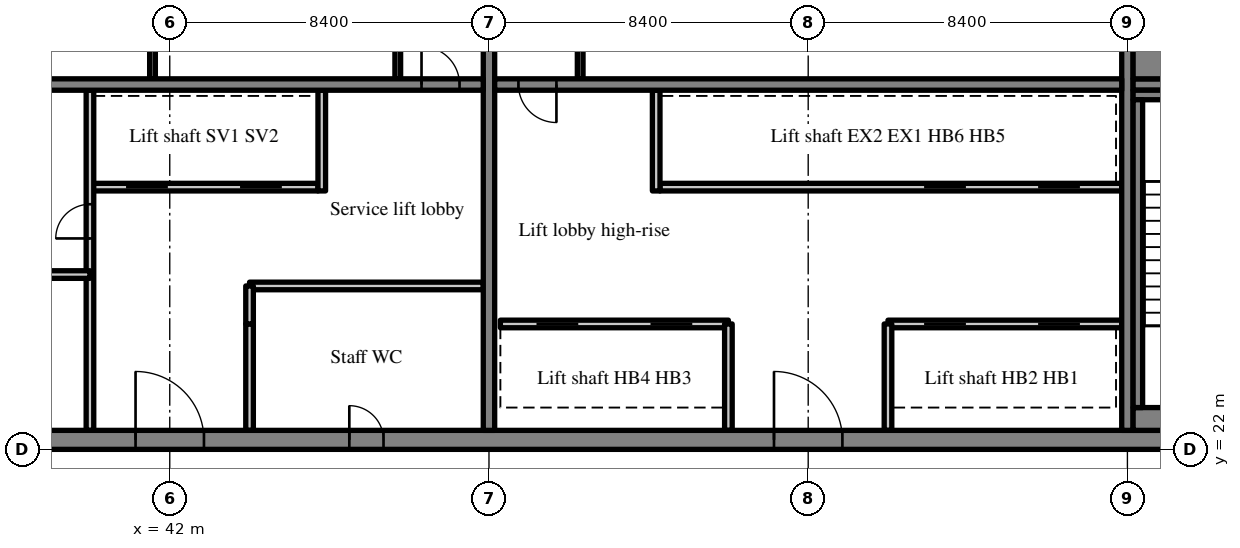
"""IFC4 building model, lengths in metres.
Left out: names, types, materials, properties, quantities, classifications, styles, units other than length and angle.
Written with IfcOpenShell. Run it as: python <this file> out.ifc"""

import sys

from ifc_helpers import new_model, si_unit, direction, frame, frame_2d, origin, place, context, subcontext, project, spatial, rectangle, extrude, source, transform, mapped, element, fill, save


model = new_model("IFC4")
c1 = context("Model", 3, precision=1e-05, world=origin(), true_north=direction((0.0, 1.0)))
c2 = subcontext(c1, "Body", "Model", "MODEL_VIEW")
j1 = project(units=[si_unit("LENGTHUNIT", "METRE"), si_unit("PLANEANGLEUNIT", "RADIAN")], contexts=[c1])
p1 = place(None, origin())
s1 = spatial("IfcSite", under=j1, at=p1, CompositionType="ELEMENT")
p2 = place(p1, origin())
s2 = spatial("IfcBuilding", under=s1, at=p2, CompositionType="ELEMENT")
p3 = place(p2, frame((0.0, 0.0, 305.7)))
s3 = spatial("IfcBuildingStorey", under=s2, at=p3, CompositionType="ELEMENT", Elevation=305.7)
m1 = source(origin(), c2, "Body", "SweptSolid", [
    extrude(rectangle(XDim=50.4, YDim=0.5, at=frame_2d((25.2, 0.0))), origin(), (0.0, 0.0, 1.0), 3.72),
])
p4 = place(p3, frame((25.2, 22.25, 0.0), z_axis=(0.0, 0.0, 1.0), x_axis=(1.0, 0.0, 0.0)))
e1 = element("IfcWall", 1, at=p4, inside=s3, PredefinedType="SHEAR", context=c2, shape_type="MappedRepresentation", body=[
    mapped(m1, transform((0.0, 0.0, 0.0), scale=1.0)),
])
m2 = source(origin(), c2, "Body", "SweptSolid", [
    extrude(rectangle(XDim=1.8, YDim=2.1, at=frame_2d((0.9, 1.05))), frame((0.0, 0.26, 0.0), z_axis=(0.0, -1.0, 0.0), x_axis=(1.0, 0.0, 0.0)), (0.0, 0.0, 1.0), 0.52),
])
p5 = place(p4, frame((15.9, 0.0, 0.0)))
e2 = element("IfcOpeningElement", 2, at=p5, cuts=e1, PredefinedType="OPENING", context=c2, shape_type="MappedRepresentation", body=[
    mapped(m2, transform((0.0, 0.0, 0.0), scale=1.0)),
])
m3 = source(origin(), c2, "Body", "SweptSolid", [
    extrude(rectangle(XDim=0.9, YDim=2.1, at=frame_2d((0.45, 1.05))), frame((0.0, 0.26, 0.0), z_axis=(0.0, -1.0, 0.0), x_axis=(1.0, 0.0, 0.0)), (0.0, 0.0, 1.0), 0.52),
])
p6 = place(p4, frame((11.175, 0.0, 0.0)))
e3 = element("IfcOpeningElement", 3, at=p6, cuts=e1, PredefinedType="OPENING", context=c2, shape_type="MappedRepresentation", body=[
    mapped(m3, transform((0.0, 0.0, 0.0), scale=1.0)),
])
p7 = place(p4, frame((21.525, 0.0, 0.0)))
e4 = element("IfcOpeningElement", 4, at=p7, cuts=e1, PredefinedType="OPENING", context=c2, shape_type="MappedRepresentation", body=[
    mapped(m3, transform((0.0, 0.0, 0.0), scale=1.0)),
])
p8 = place(p4, frame((32.7, 0.0, 0.0)))
e5 = element("IfcOpeningElement", 5, at=p8, cuts=e1, PredefinedType="OPENING", context=c2, shape_type="MappedRepresentation", body=[
    mapped(m2, transform((0.0, 0.0, 0.0), scale=1.0)),
])
m4 = source(origin(), c2, "Body", "SweptSolid", [
    extrude(rectangle(XDim=1.2, YDim=2.1, at=frame_2d((0.6, 1.05))), frame((0.0, 0.26, 0.0), z_axis=(0.0, -1.0, 0.0), x_axis=(1.0, 0.0, 0.0)), (0.0, 0.0, 1.0), 0.52),
])
p9 = place(p4, frame((6.5, 0.0, 0.0)))
e6 = element("IfcOpeningElement", 6, at=p9, cuts=e1, PredefinedType="OPENING", context=c2, shape_type="MappedRepresentation", body=[
    mapped(m4, transform((0.0, 0.0, 0.0), scale=1.0)),
])
p10 = place(p4, frame((47.975, 0.0, 0.0)))
e7 = element("IfcOpeningElement", 7, at=p10, cuts=e1, PredefinedType="OPENING", context=c2, shape_type="MappedRepresentation", body=[
    mapped(m4, transform((0.0, 0.0, 0.0), scale=1.0)),
])
m5 = source(origin(), c2, "Body", "SweptSolid", [
    extrude(rectangle(XDim=19.0, YDim=0.3, at=frame_2d((9.5, 0.0))), origin(), (0.0, 0.0, 1.0), 3.72),
])
p11 = place(p3, frame((50.4, 22.5, 0.0), z_axis=(0.0, 0.0, 1.0), x_axis=(0.0, 1.0, 0.0)))
e8 = element("IfcWall", 8, at=p11, inside=s3, PredefinedType="SHEAR", context=c2, shape_type="MappedRepresentation", body=[
    mapped(m5, transform((0.0, 0.0, 0.0), scale=1.0)),
])
m6 = source(origin(), c2, "Body", "SweptSolid", [
    extrude(rectangle(XDim=1.1, YDim=2.1, at=frame_2d((0.55, 1.05))), frame((0.0, 0.16, 0.0), z_axis=(0.0, -1.0, 0.0), x_axis=(1.0, 0.0, 0.0)), (0.0, 0.0, 1.0), 0.32),
])
p12 = place(p11, frame((12.95, 0.0, 0.0)))
e9 = element("IfcOpeningElement", 9, at=p12, cuts=e8, PredefinedType="OPENING", context=c2, shape_type="MappedRepresentation", body=[
    mapped(m6, transform((0.0, 0.0, 0.0), scale=1.0)),
])
p13 = place(p3, frame((67.2, 22.5, 0.0), z_axis=(0.0, 0.0, 1.0), x_axis=(0.0, 1.0, 0.0)))
e10 = element("IfcWall", 10, at=p13, inside=s3, PredefinedType="SHEAR", context=c2, shape_type="MappedRepresentation", body=[
    mapped(m5, transform((0.0, 0.0, 0.0), scale=1.0)),
])
m7 = source(origin(), c2, "Body", "SweptSolid", [
    extrude(rectangle(XDim=16.5, YDim=0.3, at=frame_2d((8.25, 0.0))), origin(), (0.0, 0.0, 1.0), 3.72),
])
p14 = place(p3, frame((33.75, 31.6, 0.0), z_axis=(0.0, 0.0, 1.0), x_axis=(1.0, 0.0, 0.0)))
e11 = element("IfcWall", 11, at=p14, inside=s3, PredefinedType="SHEAR", context=c2, shape_type="MappedRepresentation", body=[
    mapped(m7, transform((0.0, 0.0, 0.0), scale=1.0)),
])
m8 = source(origin(), c2, "Body", "SweptSolid", [
    extrude(rectangle(XDim=1.0, YDim=2.1, at=frame_2d((0.5, 1.05))), frame((0.0, 0.16, 0.0), z_axis=(0.0, -1.0, 0.0), x_axis=(1.0, 0.0, 0.0)), (0.0, 0.0, 1.0), 0.32),
])
p15 = place(p14, frame((14.875, 0.0, 0.0)))
e12 = element("IfcOpeningElement", 12, at=p15, cuts=e11, PredefinedType="OPENING", context=c2, shape_type="MappedRepresentation", body=[
    mapped(m8, transform((0.0, 0.0, 0.0), scale=1.0)),
])
p16 = place(p3, frame((50.55, 31.6, 0.0), z_axis=(0.0, 0.0, 1.0), x_axis=(1.0, 0.0, 0.0)))
e13 = element("IfcWall", 13, at=p16, inside=s3, PredefinedType="SHEAR", context=c2, shape_type="MappedRepresentation", body=[
    mapped(m7, transform((0.0, 0.0, 0.0), scale=1.0)),
])
p17 = place(p16, frame((0.625, 0.0, 0.0)))
e14 = element("IfcOpeningElement", 14, at=p17, cuts=e13, PredefinedType="OPENING", context=c2, shape_type="MappedRepresentation", body=[
    mapped(m8, transform((0.0, 0.0, 0.0), scale=1.0)),
])
m9 = source(origin(), c2, "Body", "SweptSolid", [
    extrude(rectangle(XDim=7.75, YDim=0.3, at=frame_2d((3.875, 0.0))), origin(), (0.0, 0.0, 1.0), 3.72),
])
p18 = place(p3, frame((67.35, 31.6, 0.0), z_axis=(0.0, 0.0, 1.0), x_axis=(1.0, 0.0, 0.0)))
e15 = element("IfcWall", 15, at=p18, inside=s3, PredefinedType="SHEAR", context=c2, shape_type="MappedRepresentation", body=[
    mapped(m9, transform((0.0, 0.0, 0.0), scale=1.0)),
])
p19 = place(p18, frame((5.875, 0.0, 0.0)))
e16 = element("IfcOpeningElement", 16, at=p19, cuts=e15, PredefinedType="OPENING", context=c2, shape_type="MappedRepresentation", body=[
    mapped(m6, transform((0.0, 0.0, 0.0), scale=1.0)),
])
m10 = source(origin(), c2, "Body", "SweptSolid", [
    extrude(rectangle(XDim=6.0, YDim=0.2, at=frame_2d((3.0, 0.0))), origin(), (0.0, 0.0, 1.0), 3.72),
])
p20 = place(p3, frame((39.9, 28.9, 0.0), z_axis=(0.0, 0.0, 1.0), x_axis=(1.0, 0.0, 0.0)))
e17 = element("IfcWall", 17, at=p20, inside=s3, PredefinedType="SOLIDWALL", context=c2, shape_type="MappedRepresentation", body=[
    mapped(m10, transform((0.0, 0.0, 0.0), scale=1.0)),
])
m11 = source(origin(), c2, "Body", "SweptSolid", [
    extrude(rectangle(XDim=1.1, YDim=2.1, at=frame_2d((0.55, 1.05))), frame((0.0, 0.11, 0.0), z_axis=(0.0, -1.0, 0.0), x_axis=(1.0, 0.0, 0.0)), (0.0, 0.0, 1.0), 0.22),
])
p21 = place(p20, frame((0.95, 0.0, 0.0)))
e18 = element("IfcOpeningElement", 18, at=p21, cuts=e17, PredefinedType="OPENING", context=c2, shape_type="MappedRepresentation", body=[
    mapped(m11, transform((0.0, 0.0, 0.0), scale=1.0)),
])
p22 = place(p20, frame((3.95, 0.0, 0.0)))
e19 = element("IfcOpeningElement", 19, at=p22, cuts=e17, PredefinedType="OPENING", context=c2, shape_type="MappedRepresentation", body=[
    mapped(m11, transform((0.0, 0.0, 0.0), scale=1.0)),
])
m12 = source(origin(), c2, "Body", "SweptSolid", [
    extrude(rectangle(XDim=8.95, YDim=0.2, at=frame_2d((4.475, 0.0))), origin(), (0.0, 0.0, 1.0), 3.72),
])
p23 = place(p3, frame((39.9, 22.5, 0.0), z_axis=(0.0, 0.0, 1.0), x_axis=(0.0, 1.0, 0.0)))
e20 = element("IfcWall", 20, at=p23, inside=s3, PredefinedType="PARTITIONING", context=c2, shape_type="MappedRepresentation", body=[
    mapped(m12, transform((0.0, 0.0, 0.0), scale=1.0)),
])
m13 = source(origin(), c2, "Body", "SweptSolid", [
    extrude(rectangle(XDim=0.9, YDim=2.1, at=frame_2d((0.45, 1.05))), frame((0.0, 0.11, 0.0), z_axis=(0.0, -1.0, 0.0), x_axis=(1.0, 0.0, 0.0)), (0.0, 0.0, 1.0), 0.22),
])
p24 = place(p23, frame((5.05, 0.0, 0.0)))
e21 = element("IfcOpeningElement", 21, at=p24, cuts=e20, PredefinedType="OPENING", context=c2, shape_type="MappedRepresentation", body=[
    mapped(m13, transform((0.0, 0.0, 0.0), scale=1.0)),
])
m14 = source(origin(), c2, "Body", "SweptSolid", [
    extrude(rectangle(XDim=2.8, YDim=0.2, at=frame_2d((1.4, 0.0))), origin(), (0.0, 0.0, 1.0), 3.72),
])
p25 = place(p3, frame((44.1, 22.5, 0.0), z_axis=(0.0, 0.0, 1.0), x_axis=(0.0, 1.0, 0.0)))
e22 = element("IfcWall", 22, at=p25, inside=s3, PredefinedType="PARTITIONING", context=c2, shape_type="MappedRepresentation", body=[
    mapped(m14, transform((0.0, 0.0, 0.0), scale=1.0)),
])
m15 = source(origin(), c2, "Body", "SweptSolid", [
    extrude(rectangle(XDim=2.65, YDim=0.2, at=frame_2d((1.325, 0.0))), origin(), (0.0, 0.0, 1.0), 3.72),
])
p26 = place(p3, frame((46.0, 28.8, 0.0), z_axis=(0.0, 0.0, 1.0), x_axis=(0.0, 1.0, 0.0)))
e23 = element("IfcWall", 23, at=p26, inside=s3, PredefinedType="SOLIDWALL", context=c2, shape_type="MappedRepresentation", body=[
    mapped(m15, transform((0.0, 0.0, 0.0), scale=1.0)),
])
m16 = source(origin(), c2, "Body", "SweptSolid", [
    extrude(rectangle(XDim=6.15, YDim=0.2, at=frame_2d((3.075, 0.0))), origin(), (0.0, 0.0, 1.0), 3.72),
])
for number, where, z_axis, x_axis in (
    (24, (33.75, 26.6, 0.0), (0.0, 0.0, 1.0), (1.0, 0.0, 0.0)),
    (25, (44.1, 26.3, 0.0), (0.0, 0.0, 1.0), (1.0, 0.0, 0.0)),
):
    element("IfcWall", number, at=place(p3, frame(where, z_axis=z_axis, x_axis=x_axis)), inside=s3, PredefinedType="PARTITIONING", context=c2, shape_type="MappedRepresentation", body=[
        mapped(m16, transform((0.0, 0.0, 0.0), scale=1.0)),
    ])
m17 = source(origin(), c2, "Body", "SweptSolid", [
    extrude(rectangle(XDim=1.0, YDim=0.2, at=frame_2d((0.5, 0.0))), origin(), (0.0, 0.0, 1.0), 3.72),
])
p27 = place(p3, frame((44.1, 25.3, 0.0), z_axis=(0.0, 0.0, 1.0), x_axis=(0.0, 1.0, 0.0)))
e26 = element("IfcWall", 26, at=p27, inside=s3, PredefinedType="PARTITIONING", context=c2, shape_type="MappedRepresentation", body=[
    mapped(m17, transform((0.0, 0.0, 0.0), scale=1.0)),
])
m18 = source(origin(), c2, "Body", "SweptSolid", [
    extrude(rectangle(XDim=3.25, YDim=0.15, at=frame_2d((1.625, 0.0))), origin(), (0.0, 0.0, 1.0), 3.72),
])
for number, where, z_axis, x_axis in (
    (27, (48.0, 31.75, 0.0), (0.0, 0.0, 1.0), (0.0, 1.0, 0.0)),
    (28, (41.546, 31.75, 0.0), (0.0, 0.0, 1.0), (0.0, 1.0, 0.0)),
):
    element("IfcWall", number, at=place(p3, frame(where, z_axis=z_axis, x_axis=x_axis)), inside=s3, PredefinedType="PARTITIONING", context=c2, shape_type="MappedRepresentation", body=[
        mapped(m18, transform((0.0, 0.0, 0.0), scale=1.0)),
    ])
m19 = source(origin(), c2, "Body", "SweptSolid", [
    extrude(rectangle(XDim=6.15, YDim=0.2, at=frame_2d((3.075, 0.0))), origin(), (0.0, 0.0, 1.0), 3.72),
])
p28 = place(p3, frame((67.05, 25.3, 0.0), z_axis=(0.0, 0.0, 1.0), x_axis=(-1.0, 0.0, 0.0)))
e29 = element("IfcWall", 29, at=p28, inside=s3, PredefinedType="SOLIDWALL", context=c2, shape_type="MappedRepresentation", body=[
    mapped(m19, transform((0.0, 0.0, 0.0), scale=1.0)),
])
p29 = place(p28, frame((1.1, 0.0, 0.0)))
e30 = element("IfcOpeningElement", 30, at=p29, cuts=e29, PredefinedType="OPENING", context=c2, shape_type="MappedRepresentation", body=[
    mapped(m11, transform((0.0, 0.0, 0.0), scale=1.0)),
])
p30 = place(p28, frame((4.1, 0.0, 0.0)))
e31 = element("IfcOpeningElement", 31, at=p30, cuts=e29, PredefinedType="OPENING", context=c2, shape_type="MappedRepresentation", body=[
    mapped(m11, transform((0.0, 0.0, 0.0), scale=1.0)),
])
p31 = place(p3, frame((56.7, 25.3, 0.0), z_axis=(0.0, 0.0, 1.0), x_axis=(-1.0, 0.0, 0.0)))
e32 = element("IfcWall", 32, at=p31, inside=s3, PredefinedType="SOLIDWALL", context=c2, shape_type="MappedRepresentation", body=[
    mapped(m10, transform((0.0, 0.0, 0.0), scale=1.0)),
])
p32 = place(p31, frame((0.95, 0.0, 0.0)))
e33 = element("IfcOpeningElement", 33, at=p32, cuts=e32, PredefinedType="OPENING", context=c2, shape_type="MappedRepresentation", body=[
    mapped(m11, transform((0.0, 0.0, 0.0), scale=1.0)),
])
p33 = place(p31, frame((3.95, 0.0, 0.0)))
e34 = element("IfcOpeningElement", 34, at=p33, cuts=e32, PredefinedType="OPENING", context=c2, shape_type="MappedRepresentation", body=[
    mapped(m11, transform((0.0, 0.0, 0.0), scale=1.0)),
])
m20 = source(origin(), c2, "Body", "SweptSolid", [
    extrude(rectangle(XDim=12.15, YDim=0.2, at=frame_2d((6.075, 0.0))), origin(), (0.0, 0.0, 1.0), 3.72),
])
p34 = place(p3, frame((67.05, 28.9, 0.0), z_axis=(0.0, 0.0, 1.0), x_axis=(-1.0, 0.0, 0.0)))
e35 = element("IfcWall", 35, at=p34, inside=s3, PredefinedType="SOLIDWALL", context=c2, shape_type="MappedRepresentation", body=[
    mapped(m20, transform((0.0, 0.0, 0.0), scale=1.0)),
])
p35 = place(p34, frame((1.1, 0.0, 0.0)))
e36 = element("IfcOpeningElement", 36, at=p35, cuts=e35, PredefinedType="OPENING", context=c2, shape_type="MappedRepresentation", body=[
    mapped(m11, transform((0.0, 0.0, 0.0), scale=1.0)),
])
p36 = place(p34, frame((4.1, 0.0, 0.0)))
e37 = element("IfcOpeningElement", 37, at=p36, cuts=e35, PredefinedType="OPENING", context=c2, shape_type="MappedRepresentation", body=[
    mapped(m11, transform((0.0, 0.0, 0.0), scale=1.0)),
])
for number, where, z_axis, x_axis in (
    (38, (60.9, 22.5, 0.0), (0.0, 0.0, 1.0), (0.0, 1.0, 0.0)),
    (39, (56.7, 22.5, 0.0), (0.0, 0.0, 1.0), (0.0, 1.0, 0.0)),
):
    element("IfcWall", number, at=place(p3, frame(where, z_axis=z_axis, x_axis=x_axis)), inside=s3, PredefinedType="SOLIDWALL", context=c2, shape_type="MappedRepresentation", body=[
        mapped(m14, transform((0.0, 0.0, 0.0), scale=1.0)),
    ])
p37 = place(p3, frame((54.8, 28.8, 0.0), z_axis=(0.0, 0.0, 1.0), x_axis=(0.0, 1.0, 0.0)))
e40 = element("IfcWall", 40, at=p37, inside=s3, PredefinedType="SOLIDWALL", context=c2, shape_type="MappedRepresentation", body=[
    mapped(m15, transform((0.0, 0.0, 0.0), scale=1.0)),
])
p38 = place(p3, frame((52.8, 31.75, 0.0), z_axis=(0.0, 0.0, 1.0), x_axis=(0.0, 1.0, 0.0)))
e41 = element("IfcWall", 41, at=p38, inside=s3, PredefinedType="PARTITIONING", context=c2, shape_type="MappedRepresentation", body=[
    mapped(m18, transform((0.0, 0.0, 0.0), scale=1.0)),
])
m21 = source(origin(), c2, "Body", "SweptSolid", [
    extrude(rectangle(XDim=4.9, YDim=0.6, at=frame_2d((2.45, 0.0))), origin(), (0.0, 0.0, 1.0), 3.72),
])
p39 = place(p3, frame((67.35, 22.8, 0.0), z_axis=(0.0, 0.0, 1.0), x_axis=(1.0, 0.0, 0.0)))
e42 = element("IfcWall", 42, at=p39, inside=s3, PredefinedType="SOLIDWALL", context=c2, shape_type="MappedRepresentation", body=[
    mapped(m21, transform((0.0, 0.0, 0.0), scale=1.0)),
])
m22 = source(origin(), c2, "Body", "SweptSolid", [
    extrude(rectangle(XDim=4.9, YDim=0.25, at=frame_2d((2.45, 0.0))), origin(), (0.0, 0.0, 1.0), 3.72),
])
p40 = place(p3, frame((67.35, 31.325, 0.0), z_axis=(0.0, 0.0, 1.0), x_axis=(1.0, 0.0, 0.0)))
e43 = element("IfcWall", 43, at=p40, inside=s3, PredefinedType="SOLIDWALL", context=c2, shape_type="MappedRepresentation", body=[
    mapped(m22, transform((0.0, 0.0, 0.0), scale=1.0)),
])
m23 = source(origin(), c2, "Body", "SweptSolid", [
    extrude(rectangle(XDim=8.1, YDim=0.25, at=frame_2d((4.05, 0.0))), origin(), (0.0, 0.0, 1.0), 3.72),
])
p41 = place(p3, frame((67.475, 23.1, 0.0), z_axis=(0.0, 0.0, 1.0), x_axis=(0.0, 1.0, 0.0)))
e44 = element("IfcWall", 44, at=p41, inside=s3, PredefinedType="SOLIDWALL", context=c2, shape_type="MappedRepresentation", body=[
    mapped(m23, transform((0.0, 0.0, 0.0), scale=1.0)),
])
m24 = source(origin(), c2, "Body", "SweptSolid", [
    extrude(rectangle(XDim=4.9, YDim=1.05, at=frame_2d((2.45, 0.0))), origin(), (0.0, 0.0, 1.0), 3.72),
])
p42 = place(p3, frame((67.35, 32.275, 0.0), z_axis=(0.0, 0.0, 1.0), x_axis=(1.0, 0.0, 0.0)))
e45 = element("IfcWall", 45, at=p42, inside=s3, PredefinedType="SOLIDWALL", context=c2, shape_type="MappedRepresentation", body=[
    mapped(m24, transform((0.0, 0.0, 0.0), scale=1.0)),
])
m25 = source(origin(), c2, "Body", "SweptSolid", [
    extrude(rectangle(XDim=1.8, YDim=2.1, at=frame_2d((0.9, 1.05))), frame((0.0, 0.175, 0.0), z_axis=(0.0, -1.0, 0.0), x_axis=(1.0, 0.0, 0.0)), (0.0, 0.0, 1.0), 0.05),
])
p43 = place(p5, origin())
e46 = element("IfcDoor", 46, at=p43, inside=s3, OperationType="DOUBLE_DOOR_SINGLE_SWING", PredefinedType="DOOR", context=c2, shape_type="MappedRepresentation", body=[
    mapped(m25, transform((0.0, 0.0, 0.0), scale=1.0)),
])
fill(e2, e46)
m26 = source(origin(), c2, "Body", "SweptSolid", [
    extrude(rectangle(XDim=1.0, YDim=2.1, at=frame_2d((0.5, 1.05))), frame((0.0, 0.025, 0.0), z_axis=(0.0, -1.0, 0.0), x_axis=(1.0, 0.0, 0.0)), (0.0, 0.0, 1.0), 0.05),
])
p44 = place(p15, origin())
e47 = element("IfcDoor", 47, at=p44, inside=s3, OperationType="SINGLE_SWING_LEFT", PredefinedType="DOOR", context=c2, shape_type="MappedRepresentation", body=[
    mapped(m26, transform((0.0, 0.0, 0.0), scale=1.0)),
])
fill(e12, e47)
m27 = source(origin(), c2, "Body", "SweptSolid", [
    extrude(rectangle(XDim=1.1, YDim=2.1, at=frame_2d((0.55, 1.05))), frame((0.0, 0.025, 0.0), z_axis=(0.0, -1.0, 0.0), x_axis=(1.0, 0.0, 0.0)), (0.0, 0.0, 1.0), 0.05),
])
p45 = place(p21, origin())
e48 = element("IfcDoor", 48, at=p45, inside=s3, OperationType="SLIDING_TO_LEFT", PredefinedType="DOOR", context=c2, shape_type="MappedRepresentation", body=[
    mapped(m27, transform((0.0, 0.0, 0.0), scale=1.0)),
])
fill(e18, e48)
p46 = place(p22, origin())
e49 = element("IfcDoor", 49, at=p46, inside=s3, OperationType="SLIDING_TO_RIGHT", PredefinedType="DOOR", context=c2, shape_type="MappedRepresentation", body=[
    mapped(m27, transform((0.0, 0.0, 0.0), scale=1.0)),
])
fill(e19, e49)
m28 = source(origin(), c2, "Body", "SweptSolid", [
    extrude(rectangle(XDim=0.9, YDim=2.1, at=frame_2d((0.45, 1.05))), frame((0.0, 0.025, 0.0), z_axis=(0.0, -1.0, 0.0), x_axis=(1.0, 0.0, 0.0)), (0.0, 0.0, 1.0), 0.05),
])
p47 = place(p24, origin())
e50 = element("IfcDoor", 50, at=p47, inside=s3, OperationType="SINGLE_SWING_LEFT", PredefinedType="DOOR", context=c2, shape_type="MappedRepresentation", body=[
    mapped(m28, transform((0.0, 0.0, 0.0), scale=1.0)),
])
fill(e21, e50)
m29 = source(origin(), c2, "Body", "SweptSolid", [
    extrude(rectangle(XDim=0.9, YDim=2.1, at=frame_2d((0.45, 1.05))), frame((0.0, 0.175, 0.0), z_axis=(0.0, -1.0, 0.0), x_axis=(1.0, 0.0, 0.0)), (0.0, 0.0, 1.0), 0.05),
])
p48 = place(p7, origin())
e51 = element("IfcDoor", 51, at=p48, inside=s3, OperationType="SINGLE_SWING_LEFT", PredefinedType="DOOR", context=c2, shape_type="MappedRepresentation", body=[
    mapped(m29, transform((0.0, 0.0, 0.0), scale=1.0)),
])
fill(e4, e51)
p49 = place(p8, origin())
e52 = element("IfcDoor", 52, at=p49, inside=s3, OperationType="DOUBLE_DOOR_SINGLE_SWING", PredefinedType="DOOR", context=c2, shape_type="MappedRepresentation", body=[
    mapped(m25, transform((0.0, 0.0, 0.0), scale=1.0)),
])
fill(e5, e52)
p50 = place(p17, origin())
e53 = element("IfcDoor", 53, at=p50, inside=s3, OperationType="SINGLE_SWING_RIGHT", PredefinedType="DOOR", context=c2, shape_type="MappedRepresentation", body=[
    mapped(m26, transform((0.0, 0.0, 0.0), scale=1.0)),
])
fill(e14, e53)
p51 = place(p29, origin())
e54 = element("IfcDoor", 54, at=p51, inside=s3, OperationType="SLIDING_TO_RIGHT", PredefinedType="DOOR", context=c2, shape_type="MappedRepresentation", body=[
    mapped(m27, transform((0.0, 0.0, 0.0), scale=1.0)),
])
fill(e30, e54)
p52 = place(p30, origin())
e55 = element("IfcDoor", 55, at=p52, inside=s3, OperationType="SLIDING_TO_LEFT", PredefinedType="DOOR", context=c2, shape_type="MappedRepresentation", body=[
    mapped(m27, transform((0.0, 0.0, 0.0), scale=1.0)),
])
fill(e31, e55)
p53 = place(p32, origin())
e56 = element("IfcDoor", 56, at=p53, inside=s3, OperationType="SLIDING_TO_RIGHT", PredefinedType="DOOR", context=c2, shape_type="MappedRepresentation", body=[
    mapped(m27, transform((0.0, 0.0, 0.0), scale=1.0)),
])
fill(e33, e56)
p54 = place(p33, origin())
e57 = element("IfcDoor", 57, at=p54, inside=s3, OperationType="SLIDING_TO_LEFT", PredefinedType="DOOR", context=c2, shape_type="MappedRepresentation", body=[
    mapped(m27, transform((0.0, 0.0, 0.0), scale=1.0)),
])
fill(e34, e57)
p55 = place(p35, origin())
e58 = element("IfcDoor", 58, at=p55, inside=s3, OperationType="SLIDING_TO_RIGHT", PredefinedType="DOOR", context=c2, shape_type="MappedRepresentation", body=[
    mapped(m27, transform((0.0, 0.0, 0.0), scale=1.0)),
])
fill(e36, e58)
p56 = place(p36, origin())
e59 = element("IfcDoor", 59, at=p56, inside=s3, OperationType="SLIDING_TO_LEFT", PredefinedType="DOOR", context=c2, shape_type="MappedRepresentation", body=[
    mapped(m27, transform((0.0, 0.0, 0.0), scale=1.0)),
])
fill(e37, e59)
save(model, sys.argv[1])
